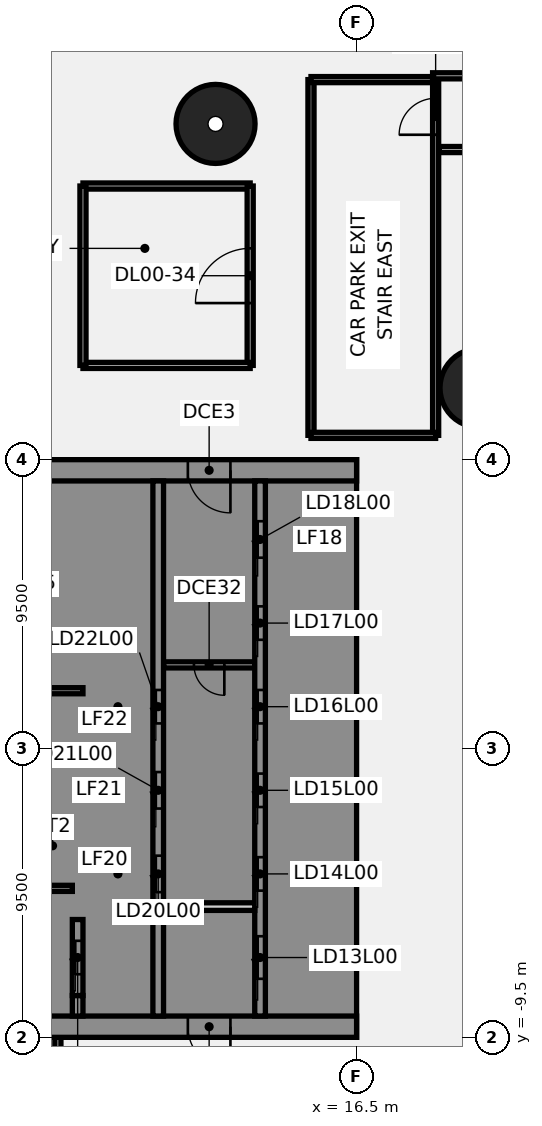
"""IFC4 building model, lengths in metres.
Left out: names, types, materials, properties, quantities, classifications, styles, units other than length and angle.
Written with IfcOpenShell. Run it as: python <this file> out.ifc"""

import sys

from ifc_helpers import new_model, si_unit, direction, frame, frame_2d, origin, origin_2d, place, context, subcontext, project, spatial, polyline, rectangle, circle, outline, extrude, element, fill, save


model = new_model("IFC4")
c1 = context("Model", 3, precision=1e-05, world=origin(), true_north=direction((0.0, 1.0)))
c2 = subcontext(c1, "Body", "Model", "MODEL_VIEW")
j1 = project(units=[si_unit("LENGTHUNIT", "METRE"), si_unit("PLANEANGLEUNIT", "RADIAN")], contexts=[c1])
p1 = place(None, origin())
s1 = spatial("IfcSite", under=j1, at=p1, CompositionType="ELEMENT")
p2 = place(p1, origin())
s2 = spatial("IfcBuilding", under=s1, at=p2, CompositionType="ELEMENT")
p3 = place(p2, origin())
s3 = spatial("IfcBuildingStorey", under=s2, at=p3, CompositionType="ELEMENT", Elevation=0.0)
for number, where, z_axis, x_axis in (
    (1, (20.543, 11.86, -0.55), (0.0, 0.0, 1.0), (1.0, 0.0, 0.0)),
    (2, (11.86, 20.543, -0.55), (0.0, 0.0, 1.0), (1.0, 0.0, 0.0)),
):
    element("IfcColumn", number, at=place(p3, frame(where, z_axis=z_axis, x_axis=x_axis)), inside=s3, PredefinedType="COLUMN", context=c2, shape_type="SweptSolid", body=[
        extrude(circle(Radius=1.3, at=origin_2d()), origin(), (0.0, 0.0, 1.0), 9.05),
    ])
p4 = place(p3, frame((15.0, 10.3, 0.0), z_axis=(0.0, 0.0, 1.0), x_axis=(0.0, 1.0, 0.0)))
e3 = element("IfcWall", 3, at=p4, inside=s3, PredefinedType="PARTITIONING", context=c2, shape_type="SweptSolid", body=[
    extrude(rectangle(XDim=11.7, YDim=0.2, at=frame_2d((5.85, 0.0))), origin(), (0.0, 0.0, 1.0), 8.5),
])
p5 = place(p3, frame((15.0, 22.0, 0.0), z_axis=(0.0, 0.0, 1.0), x_axis=(1.0, 0.0, 0.0)))
e4 = element("IfcWall", 4, at=p5, inside=s3, PredefinedType="PARTITIONING", context=c2, shape_type="SweptSolid", body=[
    extrude(rectangle(XDim=4.1, YDim=0.2, at=frame_2d((2.05, 0.0))), origin(), (0.0, 0.0, 1.0), 8.5),
])
p6 = place(p3, frame((19.1, 10.3, 0.0), z_axis=(0.0, 0.0, 1.0), x_axis=(0.0, 1.0, 0.0)))
e5 = element("IfcWall", 5, at=p6, inside=s3, PredefinedType="PARTITIONING", context=c2, shape_type="SweptSolid", body=[
    extrude(rectangle(XDim=11.7, YDim=0.2, at=frame_2d((5.85, 0.0))), origin(), (0.0, 0.0, 1.0), 8.5),
])
p7 = place(p6, frame((9.886, 0.0, 0.0)))
e6 = element("IfcOpeningElement", 6, at=p7, cuts=e5, PredefinedType="OPENING", context=c2, shape_type="SweptSolid", body=[
    extrude(rectangle(XDim=1.2, YDim=2.1, at=frame_2d((0.6, 1.05))), frame((0.0, 0.11, 0.0), z_axis=(0.0, -1.0, 0.0), x_axis=(1.0, 0.0, 0.0)), (0.0, 0.0, 1.0), 0.22),
])
p8 = place(p3, frame((15.0, 10.3, 0.0), z_axis=(0.0, 0.0, 1.0), x_axis=(1.0, 0.0, 0.0)))
e7 = element("IfcWall", 7, at=p8, inside=s3, PredefinedType="PARTITIONING", context=c2, shape_type="SweptSolid", body=[
    extrude(rectangle(XDim=4.1, YDim=0.2, at=frame_2d((2.05, 0.0))), origin(), (0.0, 0.0, 1.0), 8.5),
])
p9 = place(p3, frame((7.5, 18.5, 0.0), z_axis=(0.0, 0.0, 1.0), x_axis=(1.0, 0.0, 0.0)))
e8 = element("IfcWall", 8, at=p9, inside=s3, PredefinedType="PARTITIONING", context=c2, shape_type="SweptSolid", body=[
    extrude(rectangle(XDim=5.5, YDim=0.2, at=frame_2d((2.75, 0.0))), origin(), (0.0, 0.0, 1.0), 8.5),
])
p10 = place(p3, frame((13.0, 12.6, 0.0), z_axis=(0.0, 0.0, 1.0), x_axis=(0.0, 1.0, 0.0)))
e9 = element("IfcWall", 9, at=p10, inside=s3, PredefinedType="PARTITIONING", context=c2, shape_type="SweptSolid", body=[
    extrude(rectangle(XDim=5.9, YDim=0.2, at=frame_2d((2.95, 0.0))), origin(), (0.0, 0.0, 1.0), 8.5),
])
p11 = place(p10, frame((2.05, 0.0, 0.0)))
e10 = element("IfcOpeningElement", 10, at=p11, cuts=e9, PredefinedType="OPENING", context=c2, shape_type="SweptSolid", body=[
    extrude(rectangle(XDim=1.8, YDim=2.1, at=frame_2d((0.9, 1.05))), frame((0.0, 0.11, 0.0), z_axis=(0.0, -1.0, 0.0), x_axis=(1.0, 0.0, 0.0)), (0.0, 0.0, 1.0), 0.22),
])
p12 = place(p3, frame((7.5, 12.6, 0.0), z_axis=(0.0, 0.0, 1.0), x_axis=(1.0, 0.0, 0.0)))
e11 = element("IfcWall", 11, at=p12, inside=s3, PredefinedType="PARTITIONING", context=c2, shape_type="SweptSolid", body=[
    extrude(rectangle(XDim=5.5, YDim=0.2, at=frame_2d((2.75, 0.0))), origin(), (0.0, 0.0, 1.0), 8.5),
])
p13 = place(p3, frame((7.5, 12.6, 0.0), z_axis=(0.0, 0.0, 1.0), x_axis=(0.0, 1.0, 0.0)))
e12 = element("IfcWall", 12, at=p13, inside=s3, PredefinedType="PARTITIONING", context=c2, shape_type="SweptSolid", body=[
    extrude(rectangle(XDim=5.9, YDim=0.2, at=frame_2d((2.95, 0.0))), origin(), (0.0, 0.0, 1.0), 8.5),
])
p14 = place(p3, frame((6.675, -9.5, 0.0), z_axis=(0.0, 0.0, 1.0), x_axis=(0.0, -1.0, 0.0)))
e13 = element("IfcWall", 13, at=p14, inside=s3, PredefinedType="PARTITIONING", context=c2, shape_type="SweptSolid", body=[
    extrude(rectangle(XDim=2.373, YDim=0.2, at=frame_2d((1.187, 0.0))), origin(), (0.0, 0.0, 1.0), 8.5),
])
p15 = place(p3, frame((19.0, 22.125, 0.0), z_axis=(0.0, 0.0, 1.0), x_axis=(1.0, 0.0, 0.0)))
e14 = element("IfcWall", 14, at=p15, inside=s3, PredefinedType="PARTITIONING", context=c2, shape_type="SweptSolid", body=[
    extrude(rectangle(XDim=4.65, YDim=0.2, at=frame_2d((2.325, 0.0))), origin(), (0.0, 0.0, 1.0), 8.5),
])
p16 = place(p3, frame((19.22, 19.7, 0.0), z_axis=(0.0, 0.0, 1.0), x_axis=(1.0, 0.0, 0.0)))
e15 = element("IfcWall", 15, at=p16, inside=s3, PredefinedType="PARTITIONING", context=c2, shape_type="SweptSolid", body=[
    extrude(rectangle(XDim=4.4, YDim=0.2, at=frame_2d((2.2, 0.0))), origin(), (0.0, 0.0, 1.0), 8.5),
])
p17 = place(p3, frame((16.5, -9.15, 0.0), z_axis=(0.0, 0.0, 1.0), x_axis=(-1.0, 0.0, 0.0)))
e16 = element("IfcWall", 16, at=p17, inside=s3, PredefinedType="SHEAR", context=c2, shape_type="SweptSolid", body=[
    extrude(rectangle(XDim=13.0, YDim=0.7, at=frame_2d((6.5, 0.0))), origin(), (0.0, 0.0, 1.0), 8.5),
])
p18 = place(p17, frame((4.15, 0.0, 0.0)))
e17 = element("IfcOpeningElement", 17, at=p18, cuts=e16, PredefinedType="OPENING", context=c2, shape_type="SweptSolid", body=[
    extrude(rectangle(XDim=1.4, YDim=2.1, at=frame_2d((0.7, 1.05))), frame((0.0, 0.36, 0.0), z_axis=(0.0, -1.0, 0.0), x_axis=(1.0, 0.0, 0.0)), (0.0, 0.0, 1.0), 0.72),
])
p19 = place(p17, frame((10.125, 0.0, 0.0)))
e18 = element("IfcOpeningElement", 18, at=p19, cuts=e16, PredefinedType="OPENING", context=c2, shape_type="SweptSolid", body=[
    extrude(rectangle(XDim=1.4, YDim=2.1, at=frame_2d((0.7, 1.05))), frame((0.0, 0.36, 0.0), z_axis=(0.0, -1.0, 0.0), x_axis=(1.0, 0.0, 0.0)), (0.0, 0.0, 1.0), 0.72),
])
p20 = place(p3, frame((16.5, 9.15, 0.0), z_axis=(0.0, 0.0, 1.0), x_axis=(-1.0, 0.0, 0.0)))
e19 = element("IfcWall", 19, at=p20, inside=s3, PredefinedType="SHEAR", context=c2, shape_type="SweptSolid", body=[
    extrude(rectangle(XDim=13.0, YDim=0.7, at=frame_2d((6.5, 0.0))), origin(), (0.0, 0.0, 1.0), 8.5),
])
p21 = place(p20, frame((4.15, 0.0, 0.0)))
e20 = element("IfcOpeningElement", 20, at=p21, cuts=e19, PredefinedType="OPENING", context=c2, shape_type="SweptSolid", body=[
    extrude(rectangle(XDim=1.4, YDim=2.1, at=frame_2d((0.7, 1.05))), frame((0.0, 0.36, 0.0), z_axis=(0.0, -1.0, 0.0), x_axis=(1.0, 0.0, 0.0)), (0.0, 0.0, 1.0), 0.72),
])
p22 = place(p3, frame((13.15, 2.75, 0.0), z_axis=(0.0, 0.0, 1.0), x_axis=(-1.0, 0.0, 0.0)))
e21 = element("IfcWall", 21, at=p22, inside=s3, PredefinedType="PARTITIONING", context=c2, shape_type="SweptSolid", body=[
    extrude(rectangle(XDim=3.0, YDim=0.2, at=frame_2d((1.5, 0.0))), origin(), (0.0, 0.0, 1.0), 8.5),
])
p23 = place(p22, frame((1.0, 0.0, 0.0)))
e22 = element("IfcOpeningElement", 22, at=p23, cuts=e21, PredefinedType="OPENING", context=c2, shape_type="SweptSolid", body=[
    extrude(rectangle(XDim=1.0, YDim=2.1, at=frame_2d((0.5, 1.05))), frame((0.0, 0.11, 0.0), z_axis=(0.0, -1.0, 0.0), x_axis=(1.0, 0.0, 0.0)), (0.0, 0.0, 1.0), 0.22),
])
p24 = place(p3, origin())
e23 = element("IfcWall", 23, at=p24, inside=s3, PredefinedType="SHEAR", context=c2, shape_type="SweptSolid", body=[
    extrude(outline(polyline([(13.5, -8.8), (15.8, -8.8), (16.5, -8.8), (16.5, 8.8), (15.8, 8.8), (13.5, 8.8), (13.5, 8.125), (15.8, 8.125), (15.8, 5.625), (13.5, 5.625), (13.5, 5.375), (15.8, 5.375), (15.8, 2.875), (13.5, 2.875), (13.5, 2.625), (15.8, 2.625), (15.8, 0.125), (13.5, 0.125), (13.5, -0.125), (15.8, -0.125), (15.8, -2.625), (13.5, -2.625), (13.5, -2.875), (15.8, -2.875), (15.8, -5.375), (13.5, -5.375), (13.5, -5.625), (15.8, -5.625), (15.8, -8.125), (13.5, -8.125), (13.5, -8.8)])), origin(), (0.0, 0.0, 1.0), 8.5),
])
p25 = place(p3, origin())
e24 = element("IfcWall", 24, at=p25, inside=s3, PredefinedType="SHEAR", context=c2, shape_type="SweptSolid", body=[
    extrude(outline(polyline([(9.8, -5.375), (7.5, -5.375), (7.5, -2.875), (9.8, -2.875), (9.8, -2.625), (7.5, -2.625), (7.5, -0.125), (9.8, -0.125), (9.8, 0.125), (7.5, 0.125), (7.5, 2.625), (9.8, 2.625), (9.8, 2.875), (7.5, 2.875), (7.5, 5.375), (9.8, 5.375), (9.8, 5.625), (7.5, 5.625), (7.5, 8.125), (9.8, 8.125), (9.8, 8.8), (7.5, 8.8), (7.15, 8.8), (7.15, -5.625), (7.5, -5.625), (9.8, -5.625), (9.8, -5.375)])), origin(), (0.0, 0.0, 1.0), 8.5),
])
p26 = place(p3, origin())
e25 = element("IfcWall", 25, at=p26, inside=s3, PredefinedType="SHEAR", context=c2, shape_type="SweptSolid", body=[
    extrude(outline(polyline([(7.5, -8.125), (7.5, -8.8), (9.8, -8.8), (9.8, -8.125), (9.8, -5.625), (9.55, -5.625), (9.55, -8.125), (7.5, -8.125)])), origin(), (0.0, 0.0, 1.0), 8.5),
])
p27 = place(p3, frame((7.325, -8.8, 0.0), z_axis=(0.0, 0.0, 1.0), x_axis=(0.0, 1.0, 0.0)))
e26 = element("IfcWall", 26, at=p27, inside=s3, PredefinedType="SHEAR", context=c2, shape_type="SweptSolid", body=[
    extrude(rectangle(XDim=0.675, YDim=0.35, at=frame_2d((0.337, 0.0))), origin(), (0.0, 0.0, 1.0), 8.5),
])
p28 = place(p3, frame((7.5, 1.9, 0.0), z_axis=(0.0, 0.0, 1.0), x_axis=(-1.0, 0.0, 0.0)))
e27 = element("IfcWall", 27, at=p28, inside=s3, PredefinedType="SHEAR", context=c2, shape_type="SweptSolid", body=[
    extrude(rectangle(XDim=3.3, YDim=0.2, at=frame_2d((1.65, 0.0))), origin(), (0.0, 0.0, 1.0), 8.5),
])
p29 = place(p3, frame((13.325, -8.8, 0.0), z_axis=(0.0, 0.0, 1.0), x_axis=(0.0, 1.0, 0.0)))
e28 = element("IfcWall", 28, at=p29, inside=s3, PredefinedType="SHEAR", context=c2, shape_type="SweptSolid", body=[
    extrude(rectangle(XDim=17.6, YDim=0.35, at=frame_2d((8.8, 0.0))), origin(), (0.0, 0.0, 1.0), 8.5),
])
p30 = place(p29, frame((1.225, 0.0, 0.0)))
e29 = element("IfcOpeningElement", 29, at=p30, cuts=e28, PredefinedType="OPENING", context=c2, shape_type="SweptSolid", body=[
    extrude(rectangle(XDim=1.4, YDim=2.1, at=frame_2d((0.7, 1.05))), frame((0.0, 0.185, 0.0), z_axis=(0.0, -1.0, 0.0), x_axis=(1.0, 0.0, 0.0)), (0.0, 0.0, 1.0), 0.37),
])
p31 = place(p29, frame((4.125, 0.0, 0.0)))
e30 = element("IfcOpeningElement", 30, at=p31, cuts=e28, PredefinedType="OPENING", context=c2, shape_type="SweptSolid", body=[
    extrude(rectangle(XDim=1.1, YDim=2.1, at=frame_2d((0.55, 1.05))), frame((0.0, 0.185, 0.0), z_axis=(0.0, -1.0, 0.0), x_axis=(1.0, 0.0, 0.0)), (0.0, 0.0, 1.0), 0.37),
])
p32 = place(p29, frame((6.875, 0.0, 0.0)))
e31 = element("IfcOpeningElement", 31, at=p32, cuts=e28, PredefinedType="OPENING", context=c2, shape_type="SweptSolid", body=[
    extrude(rectangle(XDim=1.1, YDim=2.1, at=frame_2d((0.55, 1.05))), frame((0.0, 0.185, 0.0), z_axis=(0.0, -1.0, 0.0), x_axis=(1.0, 0.0, 0.0)), (0.0, 0.0, 1.0), 0.37),
])
p33 = place(p29, frame((9.625, 0.0, 0.0)))
e32 = element("IfcOpeningElement", 32, at=p33, cuts=e28, PredefinedType="OPENING", context=c2, shape_type="SweptSolid", body=[
    extrude(rectangle(XDim=1.1, YDim=2.1, at=frame_2d((0.55, 1.05))), frame((0.0, 0.185, 0.0), z_axis=(0.0, -1.0, 0.0), x_axis=(1.0, 0.0, 0.0)), (0.0, 0.0, 1.0), 0.37),
])
p34 = place(p29, frame((12.375, 0.0, 0.0)))
e33 = element("IfcOpeningElement", 33, at=p34, cuts=e28, PredefinedType="OPENING", context=c2, shape_type="SweptSolid", body=[
    extrude(rectangle(XDim=1.1, YDim=2.1, at=frame_2d((0.55, 1.05))), frame((0.0, 0.185, 0.0), z_axis=(0.0, -1.0, 0.0), x_axis=(1.0, 0.0, 0.0)), (0.0, 0.0, 1.0), 0.37),
])
p35 = place(p29, frame((15.075, 0.0, 0.0)))
e34 = element("IfcOpeningElement", 34, at=p35, cuts=e28, PredefinedType="OPENING", context=c2, shape_type="SweptSolid", body=[
    extrude(rectangle(XDim=1.2, YDim=2.1, at=frame_2d((0.6, 1.05))), frame((0.0, 0.185, 0.0), z_axis=(0.0, -1.0, 0.0), x_axis=(1.0, 0.0, 0.0)), (0.0, 0.0, 1.0), 0.37),
])
p36 = place(p3, frame((9.975, -8.8, 0.0), z_axis=(0.0, 0.0, 1.0), x_axis=(0.0, 1.0, 0.0)))
e35 = element("IfcWall", 35, at=p36, inside=s3, PredefinedType="SHEAR", context=c2, shape_type="SweptSolid", body=[
    extrude(rectangle(XDim=17.6, YDim=0.35, at=frame_2d((8.8, 0.0))), origin(), (0.0, 0.0, 1.0), 8.5),
])
p37 = place(p36, frame((4.075, 0.0, 0.0)))
e36 = element("IfcOpeningElement", 36, at=p37, cuts=e35, PredefinedType="OPENING", context=c2, shape_type="SweptSolid", body=[
    extrude(rectangle(XDim=1.2, YDim=2.1, at=frame_2d((0.6, 1.05))), frame((0.0, 0.185, 0.0), z_axis=(0.0, -1.0, 0.0), x_axis=(1.0, 0.0, 0.0)), (0.0, 0.0, 1.0), 0.37),
])
p38 = place(p36, frame((6.825, 0.0, 0.0)))
e37 = element("IfcOpeningElement", 37, at=p38, cuts=e35, PredefinedType="OPENING", context=c2, shape_type="SweptSolid", body=[
    extrude(rectangle(XDim=1.2, YDim=2.1, at=frame_2d((0.6, 1.05))), frame((0.0, 0.185, 0.0), z_axis=(0.0, -1.0, 0.0), x_axis=(1.0, 0.0, 0.0)), (0.0, 0.0, 1.0), 0.37),
])
p39 = place(p36, frame((9.625, 0.0, 0.0)))
e38 = element("IfcOpeningElement", 38, at=p39, cuts=e35, PredefinedType="OPENING", context=c2, shape_type="SweptSolid", body=[
    extrude(rectangle(XDim=1.1, YDim=2.1, at=frame_2d((0.55, 1.05))), frame((0.0, 0.185, 0.0), z_axis=(0.0, -1.0, 0.0), x_axis=(1.0, 0.0, 0.0)), (0.0, 0.0, 1.0), 0.37),
])
p40 = place(p3, frame((7.325, -8.125, 0.0), z_axis=(0.0, 0.0, 1.0), x_axis=(0.0, 1.0, 0.0)))
e39 = element("IfcWall", 39, at=p40, inside=s3, PredefinedType="SHEAR", context=c2, shape_type="SweptSolid", body=[
    extrude(rectangle(XDim=2.5, YDim=0.35, at=frame_2d((1.25, 0.0))), origin(), (0.0, 0.0, 1.0), 8.5),
])
p41 = place(p40, frame((0.7, 0.0, 0.0)))
e40 = element("IfcOpeningElement", 40, at=p41, cuts=e39, PredefinedType="OPENING", context=c2, shape_type="SweptSolid", body=[
    extrude(rectangle(XDim=1.1, YDim=2.1, at=frame_2d((0.55, 1.05))), frame((0.0, 0.185, 0.0), z_axis=(0.0, -1.0, 0.0), x_axis=(1.0, 0.0, 0.0)), (0.0, 0.0, 1.0), 0.37),
])
p42 = place(p3, frame((7.15, -4.6, 0.0), z_axis=(0.0, 0.0, 1.0), x_axis=(-1.0, 0.0, 0.0)))
e41 = element("IfcWall", 41, at=p42, inside=s3, PredefinedType="SHEAR", context=c2, shape_type="SweptSolid", body=[
    extrude(rectangle(XDim=2.95, YDim=0.2, at=frame_2d((1.475, 0.0))), origin(), (0.0, 0.0, 1.0), 8.5),
])
p43 = place(p42, frame((0.875, 0.0, 0.0)))
e42 = element("IfcOpeningElement", 42, at=p43, cuts=e41, PredefinedType="OPENING", context=c2, shape_type="SweptSolid", body=[
    extrude(rectangle(XDim=1.2, YDim=2.1, at=frame_2d((0.6, 1.05))), frame((0.0, 0.11, 0.0), z_axis=(0.0, -1.0, 0.0), x_axis=(1.0, 0.0, 0.0)), (0.0, 0.0, 1.0), 0.22),
])
p44 = place(p3, frame((13.15, -5.2, 0.0), z_axis=(0.0, 0.0, 1.0), x_axis=(-1.0, 0.0, 0.0)))
e43 = element("IfcWall", 43, at=p44, inside=s3, PredefinedType="PARTITIONING", context=c2, shape_type="SweptSolid", body=[
    extrude(rectangle(XDim=3.0, YDim=0.25, at=frame_2d((1.5, 0.0))), origin(), (0.0, 0.0, 1.0), 8.5),
])
p45 = place(p7, origin())
e44 = element("IfcDoor", 44, at=p45, inside=s3, OperationType="SINGLE_SWING_RIGHT", PredefinedType="DOOR", context=c2, shape_type="SweptSolid", body=[
    extrude(rectangle(XDim=1.2, YDim=2.1, at=frame_2d((0.6, 1.05))), frame((0.0, 0.025, 0.0), z_axis=(0.0, -1.0, 0.0), x_axis=(1.0, 0.0, 0.0)), (0.0, 0.0, 1.0), 0.05),
])
fill(e6, e44)
p46 = place(p11, origin())
e45 = element("IfcDoor", 45, at=p46, inside=s3, OperationType="SINGLE_SWING_RIGHT", PredefinedType="DOOR", context=c2, shape_type="SweptSolid", body=[
    extrude(rectangle(XDim=1.8, YDim=2.1, at=frame_2d((0.9, 1.05))), frame((0.0, 0.025, 0.0), z_axis=(0.0, -1.0, 0.0), x_axis=(1.0, 0.0, 0.0)), (0.0, 0.0, 1.0), 0.05),
])
fill(e10, e45)
p47 = place(p18, origin())
e46 = element("IfcDoor", 46, at=p47, inside=s3, OperationType="SINGLE_SWING_LEFT", PredefinedType="DOOR", context=c2, shape_type="SweptSolid", body=[
    extrude(rectangle(XDim=1.4, YDim=2.1, at=frame_2d((0.7, 1.05))), frame((0.0, 0.025, 0.0), z_axis=(0.0, -1.0, 0.0), x_axis=(1.0, 0.0, 0.0)), (0.0, 0.0, 1.0), 0.05),
])
fill(e17, e46)
p48 = place(p21, origin())
e47 = element("IfcDoor", 47, at=p48, inside=s3, OperationType="SINGLE_SWING_LEFT", PredefinedType="DOOR", context=c2, shape_type="SweptSolid", body=[
    extrude(rectangle(XDim=1.4, YDim=2.1, at=frame_2d((0.7, 1.05))), frame((0.0, 0.025, 0.0), z_axis=(0.0, -1.0, 0.0), x_axis=(1.0, 0.0, 0.0)), (0.0, 0.0, 1.0), 0.05),
])
fill(e20, e47)
p49 = place(p30, origin())
e48 = element("IfcDoor", 48, at=p49, inside=s3, OperationType="SLIDING_TO_LEFT", PredefinedType="DOOR", context=c2, shape_type="SweptSolid", body=[
    extrude(rectangle(XDim=1.4, YDim=2.1, at=frame_2d((0.7, 1.05))), frame((0.0, 0.025, 0.0), z_axis=(0.0, -1.0, 0.0), x_axis=(1.0, 0.0, 0.0)), (0.0, 0.0, 1.0), 0.05),
])
fill(e29, e48)
p50 = place(p31, origin())
e49 = element("IfcDoor", 49, at=p50, inside=s3, OperationType="SLIDING_TO_LEFT", PredefinedType="DOOR", context=c2, shape_type="SweptSolid", body=[
    extrude(rectangle(XDim=1.1, YDim=2.1, at=frame_2d((0.55, 1.05))), frame((0.0, 0.025, 0.0), z_axis=(0.0, -1.0, 0.0), x_axis=(1.0, 0.0, 0.0)), (0.0, 0.0, 1.0), 0.05),
])
fill(e30, e49)
p51 = place(p32, origin())
e50 = element("IfcDoor", 50, at=p51, inside=s3, OperationType="SLIDING_TO_LEFT", PredefinedType="DOOR", context=c2, shape_type="SweptSolid", body=[
    extrude(rectangle(XDim=1.1, YDim=2.1, at=frame_2d((0.55, 1.05))), frame((0.0, 0.025, 0.0), z_axis=(0.0, -1.0, 0.0), x_axis=(1.0, 0.0, 0.0)), (0.0, 0.0, 1.0), 0.05),
])
fill(e31, e50)
p52 = place(p33, origin())
e51 = element("IfcDoor", 51, at=p52, inside=s3, OperationType="SLIDING_TO_LEFT", PredefinedType="DOOR", context=c2, shape_type="SweptSolid", body=[
    extrude(rectangle(XDim=1.1, YDim=2.1, at=frame_2d((0.55, 1.05))), frame((0.0, 0.025, 0.0), z_axis=(0.0, -1.0, 0.0), x_axis=(1.0, 0.0, 0.0)), (0.0, 0.0, 1.0), 0.05),
])
fill(e32, e51)
p53 = place(p34, origin())
e52 = element("IfcDoor", 52, at=p53, inside=s3, OperationType="SLIDING_TO_LEFT", PredefinedType="DOOR", context=c2, shape_type="SweptSolid", body=[
    extrude(rectangle(XDim=1.1, YDim=2.1, at=frame_2d((0.55, 1.05))), frame((0.0, 0.025, 0.0), z_axis=(0.0, -1.0, 0.0), x_axis=(1.0, 0.0, 0.0)), (0.0, 0.0, 1.0), 0.05),
])
fill(e33, e52)
p54 = place(p35, origin())
e53 = element("IfcDoor", 53, at=p54, inside=s3, OperationType="SLIDING_TO_LEFT", PredefinedType="DOOR", context=c2, shape_type="SweptSolid", body=[
    extrude(rectangle(XDim=1.2, YDim=2.1, at=frame_2d((0.6, 1.05))), frame((0.0, 0.025, 0.0), z_axis=(0.0, -1.0, 0.0), x_axis=(1.0, 0.0, 0.0)), (0.0, 0.0, 1.0), 0.05),
])
fill(e34, e53)
p55 = place(p41, origin())
e54 = element("IfcDoor", 54, at=p55, inside=s3, OperationType="SLIDING_TO_LEFT", PredefinedType="DOOR", context=c2, shape_type="SweptSolid", body=[
    extrude(rectangle(XDim=1.1, YDim=2.1, at=frame_2d((0.55, 1.05))), frame((0.0, 0.025, 0.0), z_axis=(0.0, -1.0, 0.0), x_axis=(1.0, 0.0, 0.0)), (0.0, 0.0, 1.0), 0.05),
])
fill(e40, e54)
p56 = place(p37, origin())
e55 = element("IfcDoor", 55, at=p56, inside=s3, OperationType="SLIDING_TO_LEFT", PredefinedType="DOOR", context=c2, shape_type="SweptSolid", body=[
    extrude(rectangle(XDim=1.2, YDim=2.1, at=frame_2d((0.6, 1.05))), frame((0.0, 0.025, 0.0), z_axis=(0.0, -1.0, 0.0), x_axis=(1.0, 0.0, 0.0)), (0.0, 0.0, 1.0), 0.05),
])
fill(e36, e55)
p57 = place(p38, origin())
e56 = element("IfcDoor", 56, at=p57, inside=s3, OperationType="SLIDING_TO_LEFT", PredefinedType="DOOR", context=c2, shape_type="SweptSolid", body=[
    extrude(rectangle(XDim=1.2, YDim=2.1, at=frame_2d((0.6, 1.05))), frame((0.0, 0.025, 0.0), z_axis=(0.0, -1.0, 0.0), x_axis=(1.0, 0.0, 0.0)), (0.0, 0.0, 1.0), 0.05),
])
fill(e37, e56)
p58 = place(p39, origin())
e57 = element("IfcDoor", 57, at=p58, inside=s3, OperationType="SLIDING_TO_LEFT", PredefinedType="DOOR", context=c2, shape_type="SweptSolid", body=[
    extrude(rectangle(XDim=1.1, YDim=2.1, at=frame_2d((0.55, 1.05))), frame((0.0, 0.025, 0.0), z_axis=(0.0, -1.0, 0.0), x_axis=(1.0, 0.0, 0.0)), (0.0, 0.0, 1.0), 0.05),
])
fill(e38, e57)
p59 = place(p23, origin())
e58 = element("IfcDoor", 58, at=p59, inside=s3, OperationType="SINGLE_SWING_LEFT", PredefinedType="DOOR", context=c2, shape_type="SweptSolid", body=[
    extrude(rectangle(XDim=1.0, YDim=2.1, at=frame_2d((0.5, 1.05))), frame((0.0, 0.025, 0.0), z_axis=(0.0, -1.0, 0.0), x_axis=(1.0, 0.0, 0.0)), (0.0, 0.0, 1.0), 0.05),
])
fill(e22, e58)
save(model, sys.argv[1])
